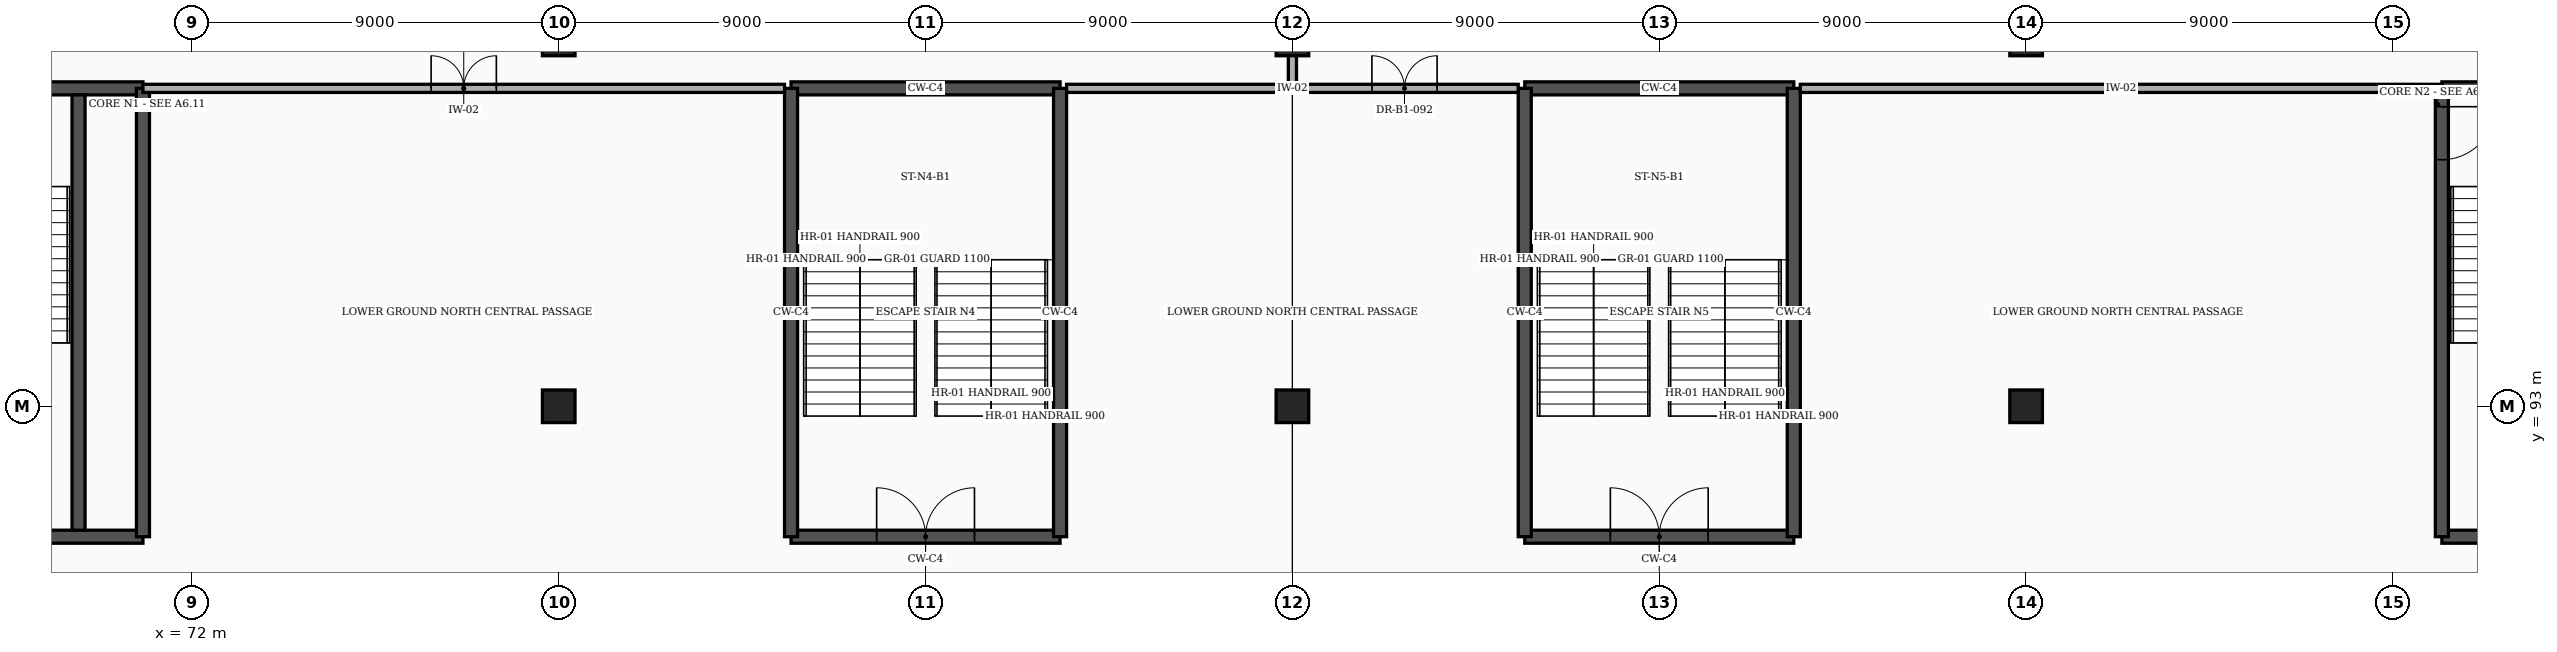
"""IFC4 building model, lengths in metres.
Left out: names, types, materials, properties, quantities, classifications, styles, units other than length and angle.
Written with IfcOpenShell. Run it as: python <this file> out.ifc"""

import sys

from ifc_helpers import new_model, si_unit, direction, frame, frame_2d, origin, origin_2d, place, context, subcontext, project, spatial, rectangle, extrude, element, fill, save


model = new_model("IFC4")
c1 = context("Model", 3, precision=1e-05, world=origin(), true_north=direction((0.0, 1.0)))
c2 = subcontext(c1, "Body", "Model", "MODEL_VIEW")
j1 = project(units=[si_unit("LENGTHUNIT", "METRE"), si_unit("PLANEANGLEUNIT", "RADIAN")], contexts=[c1])
p1 = place(None, origin())
s1 = spatial("IfcSite", under=j1, at=p1, CompositionType="ELEMENT")
p2 = place(p1, origin())
s2 = spatial("IfcBuilding", under=s1, at=p2, CompositionType="ELEMENT")
p3 = place(p2, frame((0.0, 0.0, -4.5)))
s3 = spatial("IfcBuildingStorey", under=s2, at=p3, CompositionType="ELEMENT", Elevation=-4.5)
for number, where, z_axis, x_axis in (
    (1, (81.0, 93.0, -0.45), (0.0, 0.0, 1.0), (1.0, 0.0, 0.0)),
    (2, (81.0, 102.0, -0.45), (0.0, 0.0, 1.0), (1.0, 0.0, 0.0)),
    (3, (99.0, 93.0, -0.45), (0.0, 0.0, 1.0), (1.0, 0.0, 0.0)),
    (4, (99.0, 102.0, -0.45), (0.0, 0.0, 1.0), (1.0, 0.0, 0.0)),
    (5, (117.0, 93.0, -0.45), (0.0, 0.0, 1.0), (1.0, 0.0, 0.0)),
    (6, (117.0, 102.0, -0.45), (0.0, 0.0, 1.0), (1.0, 0.0, 0.0)),
):
    element("IfcColumn", number, at=place(p3, frame(where, z_axis=z_axis, x_axis=x_axis)), inside=s3, PredefinedType="COLUMN", context=c2, shape_type="SweptSolid", body=[
        extrude(rectangle(XDim=0.8, YDim=0.8, at=origin_2d()), origin(), (0.0, 0.0, 1.0), 4.95),
    ])
for number, where, z_axis, x_axis in (
    (7, (64.2, 89.8, 0.0), (0.0, 0.0, 1.0), (1.0, 0.0, 0.0)),
    (8, (64.2, 100.8, 0.0), (0.0, 0.0, 1.0), (1.0, 0.0, 0.0)),
):
    element("IfcWall", number, at=place(p3, frame(where, z_axis=z_axis, x_axis=x_axis)), inside=s3, PredefinedType="SHEAR", context=c2, shape_type="SweptSolid", body=[
        extrude(rectangle(XDim=6.6, YDim=0.32, at=frame_2d((3.3, 0.0))), origin(), (0.0, 0.0, 1.0), 4.24),
    ])
p4 = place(p3, frame((70.8, 89.8, 0.0), z_axis=(0.0, 0.0, 1.0), x_axis=(0.0, 1.0, 0.0)))
e9 = element("IfcWall", 9, at=p4, inside=s3, PredefinedType="SHEAR", context=c2, shape_type="SweptSolid", body=[
    extrude(rectangle(XDim=11.0, YDim=0.32, at=frame_2d((5.5, 0.0))), origin(), (0.0, 0.0, 1.0), 4.24),
])
p5 = place(p3, frame((69.22, 89.96, 0.0), z_axis=(0.0, 0.0, 1.0), x_axis=(0.0, 1.0, 0.0)))
e10 = element("IfcWall", 10, at=p5, inside=s3, PredefinedType="SHEAR", context=c2, shape_type="SweptSolid", body=[
    extrude(rectangle(XDim=10.68, YDim=0.32, at=frame_2d((5.34, 0.0))), origin(), (0.0, 0.0, 1.0), 4.24),
])
p6 = place(p3, frame((127.2, 89.8, 0.0), z_axis=(0.0, 0.0, 1.0), x_axis=(1.0, 0.0, 0.0)))
e11 = element("IfcWall", 11, at=p6, inside=s3, PredefinedType="SHEAR", context=c2, shape_type="SweptSolid", body=[
    extrude(rectangle(XDim=6.6, YDim=0.32, at=frame_2d((3.3, 0.0))), origin(), (0.0, 0.0, 1.0), 4.24),
])
p7 = place(p6, frame((4.45, 0.0, 0.0)))
e12 = element("IfcOpeningElement", 12, at=p7, cuts=e11, PredefinedType="OPENING", context=c2, shape_type="SweptSolid", body=[
    extrude(rectangle(XDim=1.6, YDim=2.3, at=frame_2d((0.8, 1.15))), frame((0.0, 0.172, 0.0), z_axis=(0.0, -1.0, 0.0), x_axis=(1.0, 0.0, 0.0)), (0.0, 0.0, 1.0), 0.344),
])
p8 = place(p3, frame((127.2, 100.8, 0.0), z_axis=(0.0, 0.0, 1.0), x_axis=(1.0, 0.0, 0.0)))
e13 = element("IfcWall", 13, at=p8, inside=s3, PredefinedType="SHEAR", context=c2, shape_type="SweptSolid", body=[
    extrude(rectangle(XDim=6.6, YDim=0.32, at=frame_2d((3.3, 0.0))), origin(), (0.0, 0.0, 1.0), 4.24),
])
p9 = place(p3, frame((127.2, 89.8, 0.0), z_axis=(0.0, 0.0, 1.0), x_axis=(0.0, 1.0, 0.0)))
e14 = element("IfcWall", 14, at=p9, inside=s3, PredefinedType="SHEAR", context=c2, shape_type="SweptSolid", body=[
    extrude(rectangle(XDim=11.0, YDim=0.32, at=frame_2d((5.5, 0.0))), origin(), (0.0, 0.0, 1.0), 4.24),
])
p10 = place(p9, frame((9.25, 0.0, 0.0)))
e15 = element("IfcOpeningElement", 15, at=p10, cuts=e14, PredefinedType="OPENING", context=c2, shape_type="SweptSolid", body=[
    extrude(rectangle(XDim=1.3, YDim=2.2, at=frame_2d((0.65, 1.1))), frame((0.0, 0.172, 0.0), z_axis=(0.0, -1.0, 0.0), x_axis=(1.0, 0.0, 0.0)), (0.0, 0.0, 1.0), 0.344),
])
p11 = place(p3, frame((86.7, 89.8, 0.0), z_axis=(0.0, 0.0, 1.0), x_axis=(1.0, 0.0, 0.0)))
e16 = element("IfcWall", 16, at=p11, inside=s3, PredefinedType="SHEAR", context=c2, shape_type="SweptSolid", body=[
    extrude(rectangle(XDim=6.6, YDim=0.32, at=frame_2d((3.3, 0.0))), origin(), (0.0, 0.0, 1.0), 4.24),
])
p12 = place(p11, frame((2.1, 0.0, 0.0)))
e17 = element("IfcOpeningElement", 17, at=p12, cuts=e16, PredefinedType="OPENING", context=c2, shape_type="SweptSolid", body=[
    extrude(rectangle(XDim=2.4, YDim=2.25, at=frame_2d((1.2, 1.125))), frame((0.0, 0.172, 0.0), z_axis=(0.0, -1.0, 0.0), x_axis=(1.0, 0.0, 0.0)), (0.0, 0.0, 1.0), 0.344),
])
p13 = place(p3, frame((86.7, 100.8, 0.0), z_axis=(0.0, 0.0, 1.0), x_axis=(1.0, 0.0, 0.0)))
e18 = element("IfcWall", 18, at=p13, inside=s3, PredefinedType="SHEAR", context=c2, shape_type="SweptSolid", body=[
    extrude(rectangle(XDim=6.6, YDim=0.32, at=frame_2d((3.3, 0.0))), origin(), (0.0, 0.0, 1.0), 4.24),
])
for number, where, z_axis, x_axis in (
    (19, (86.7, 89.8, 0.0), (0.0, 0.0, 1.0), (0.0, 1.0, 0.0)),
    (20, (93.3, 89.8, 0.0), (0.0, 0.0, 1.0), (0.0, 1.0, 0.0)),
):
    element("IfcWall", number, at=place(p3, frame(where, z_axis=z_axis, x_axis=x_axis)), inside=s3, PredefinedType="SHEAR", context=c2, shape_type="SweptSolid", body=[
        extrude(rectangle(XDim=11.0, YDim=0.32, at=frame_2d((5.5, 0.0))), origin(), (0.0, 0.0, 1.0), 4.24),
    ])
p14 = place(p3, frame((104.7, 89.8, 0.0), z_axis=(0.0, 0.0, 1.0), x_axis=(1.0, 0.0, 0.0)))
e21 = element("IfcWall", 21, at=p14, inside=s3, PredefinedType="SHEAR", context=c2, shape_type="SweptSolid", body=[
    extrude(rectangle(XDim=6.6, YDim=0.32, at=frame_2d((3.3, 0.0))), origin(), (0.0, 0.0, 1.0), 4.24),
])
p15 = place(p14, frame((2.1, 0.0, 0.0)))
e22 = element("IfcOpeningElement", 22, at=p15, cuts=e21, PredefinedType="OPENING", context=c2, shape_type="SweptSolid", body=[
    extrude(rectangle(XDim=2.4, YDim=2.25, at=frame_2d((1.2, 1.125))), frame((0.0, 0.172, 0.0), z_axis=(0.0, -1.0, 0.0), x_axis=(1.0, 0.0, 0.0)), (0.0, 0.0, 1.0), 0.344),
])
p16 = place(p3, frame((104.7, 100.8, 0.0), z_axis=(0.0, 0.0, 1.0), x_axis=(1.0, 0.0, 0.0)))
e23 = element("IfcWall", 23, at=p16, inside=s3, PredefinedType="SHEAR", context=c2, shape_type="SweptSolid", body=[
    extrude(rectangle(XDim=6.6, YDim=0.32, at=frame_2d((3.3, 0.0))), origin(), (0.0, 0.0, 1.0), 4.24),
])
for number, where, z_axis, x_axis in (
    (24, (104.7, 89.8, 0.0), (0.0, 0.0, 1.0), (0.0, 1.0, 0.0)),
    (25, (111.3, 89.8, 0.0), (0.0, 0.0, 1.0), (0.0, 1.0, 0.0)),
):
    element("IfcWall", number, at=place(p3, frame(where, z_axis=z_axis, x_axis=x_axis)), inside=s3, PredefinedType="SHEAR", context=c2, shape_type="SweptSolid", body=[
        extrude(rectangle(XDim=11.0, YDim=0.32, at=frame_2d((5.5, 0.0))), origin(), (0.0, 0.0, 1.0), 4.24),
    ])
p17 = place(p3, frame((99.0, 100.91, 0.0), z_axis=(0.0, 0.0, 1.0), x_axis=(0.0, 1.0, 0.0)))
e26 = element("IfcWall", 26, at=p17, inside=s3, PredefinedType="PARTITIONING", context=c2, shape_type="SweptSolid", body=[
    extrude(rectangle(XDim=24.88, YDim=0.2, at=frame_2d((12.44, 0.0))), origin(), (0.0, 0.0, 1.0), 3.628),
])
p18 = place(p3, frame((70.8, 100.8, 0.0), z_axis=(0.0, 0.0, 1.0), x_axis=(1.0, 0.0, 0.0)))
e27 = element("IfcWall", 27, at=p18, inside=s3, PredefinedType="PARTITIONING", context=c2, shape_type="SweptSolid", body=[
    extrude(rectangle(XDim=15.74, YDim=0.2, at=frame_2d((7.87, 0.0))), origin(), (0.0, 0.0, 1.0), 4.24),
])
p19 = place(p18, frame((7.07, 0.0, 0.0)))
e28 = element("IfcOpeningElement", 28, at=p19, cuts=e27, PredefinedType="OPENING", context=c2, shape_type="SweptSolid", body=[
    extrude(rectangle(XDim=1.6, YDim=2.3, at=frame_2d((0.8, 1.15))), frame((0.0, 0.112, 0.0), z_axis=(0.0, -1.0, 0.0), x_axis=(1.0, 0.0, 0.0)), (0.0, 0.0, 1.0), 0.224),
])
p20 = place(p3, frame((93.46, 100.8, 0.0), z_axis=(0.0, 0.0, 1.0), x_axis=(1.0, 0.0, 0.0)))
e29 = element("IfcWall", 29, at=p20, inside=s3, PredefinedType="PARTITIONING", context=c2, shape_type="SweptSolid", body=[
    extrude(rectangle(XDim=11.08, YDim=0.2, at=frame_2d((5.54, 0.0))), origin(), (0.0, 0.0, 1.0), 4.24),
])
p21 = place(p20, frame((7.49, 0.0, 0.0)))
e30 = element("IfcOpeningElement", 30, at=p21, cuts=e29, PredefinedType="OPENING", context=c2, shape_type="SweptSolid", body=[
    extrude(rectangle(XDim=1.6, YDim=2.3, at=frame_2d((0.8, 1.15))), frame((0.0, 0.112, 0.0), z_axis=(0.0, -1.0, 0.0), x_axis=(1.0, 0.0, 0.0)), (0.0, 0.0, 1.0), 0.224),
])
p22 = place(p3, frame((111.46, 100.8, 0.0), z_axis=(0.0, 0.0, 1.0), x_axis=(1.0, 0.0, 0.0)))
e31 = element("IfcWall", 31, at=p22, inside=s3, PredefinedType="PARTITIONING", context=c2, shape_type="SweptSolid", body=[
    extrude(rectangle(XDim=15.74, YDim=0.2, at=frame_2d((7.87, 0.0))), origin(), (0.0, 0.0, 1.0), 4.24),
])
p23 = place(p10, frame((1.3, 0.0, 0.0), z_axis=(0.0, 0.0, 1.0), x_axis=(-1.0, 0.0, 0.0)))
e32 = element("IfcDoor", 32, at=p23, inside=s3, OperationType="SINGLE_SWING_LEFT", PredefinedType="DOOR", context=c2, shape_type="SweptSolid", body=[
    extrude(rectangle(XDim=1.3, YDim=2.2, at=frame_2d((0.65, 1.1))), frame((0.0, 0.025, 0.0), z_axis=(0.0, -1.0, 0.0), x_axis=(1.0, 0.0, 0.0)), (0.0, 0.0, 1.0), 0.05),
])
fill(e15, e32)
p24 = place(p12, origin())
e33 = element("IfcDoor", 33, at=p24, inside=s3, OperationType="DOUBLE_DOOR_SINGLE_SWING", PredefinedType="DOOR", context=c2, shape_type="SweptSolid", body=[
    extrude(rectangle(XDim=2.4, YDim=2.25, at=frame_2d((1.2, 1.125))), frame((0.0, 0.025, 0.0), z_axis=(0.0, -1.0, 0.0), x_axis=(1.0, 0.0, 0.0)), (0.0, 0.0, 1.0), 0.05),
])
fill(e17, e33)
p25 = place(p15, origin())
e34 = element("IfcDoor", 34, at=p25, inside=s3, OperationType="DOUBLE_DOOR_SINGLE_SWING", PredefinedType="DOOR", context=c2, shape_type="SweptSolid", body=[
    extrude(rectangle(XDim=2.4, YDim=2.25, at=frame_2d((1.2, 1.125))), frame((0.0, 0.025, 0.0), z_axis=(0.0, -1.0, 0.0), x_axis=(1.0, 0.0, 0.0)), (0.0, 0.0, 1.0), 0.05),
])
fill(e22, e34)
p26 = place(p19, origin())
e35 = element("IfcDoor", 35, at=p26, inside=s3, OperationType="DOUBLE_DOOR_SINGLE_SWING", PredefinedType="DOOR", context=c2, shape_type="SweptSolid", body=[
    extrude(rectangle(XDim=1.6, YDim=2.3, at=frame_2d((0.8, 1.15))), frame((0.0, 0.025, 0.0), z_axis=(0.0, -1.0, 0.0), x_axis=(1.0, 0.0, 0.0)), (0.0, 0.0, 1.0), 0.05),
])
fill(e28, e35)
p27 = place(p21, origin())
e36 = element("IfcDoor", 36, at=p27, inside=s3, OperationType="DOUBLE_DOOR_SINGLE_SWING", PredefinedType="DOOR", context=c2, shape_type="SweptSolid", body=[
    extrude(rectangle(XDim=1.6, YDim=2.3, at=frame_2d((0.8, 1.15))), frame((0.0, 0.025, 0.0), z_axis=(0.0, -1.0, 0.0), x_axis=(1.0, 0.0, 0.0)), (0.0, 0.0, 1.0), 0.05),
])
fill(e30, e36)
save(model, sys.argv[1])
